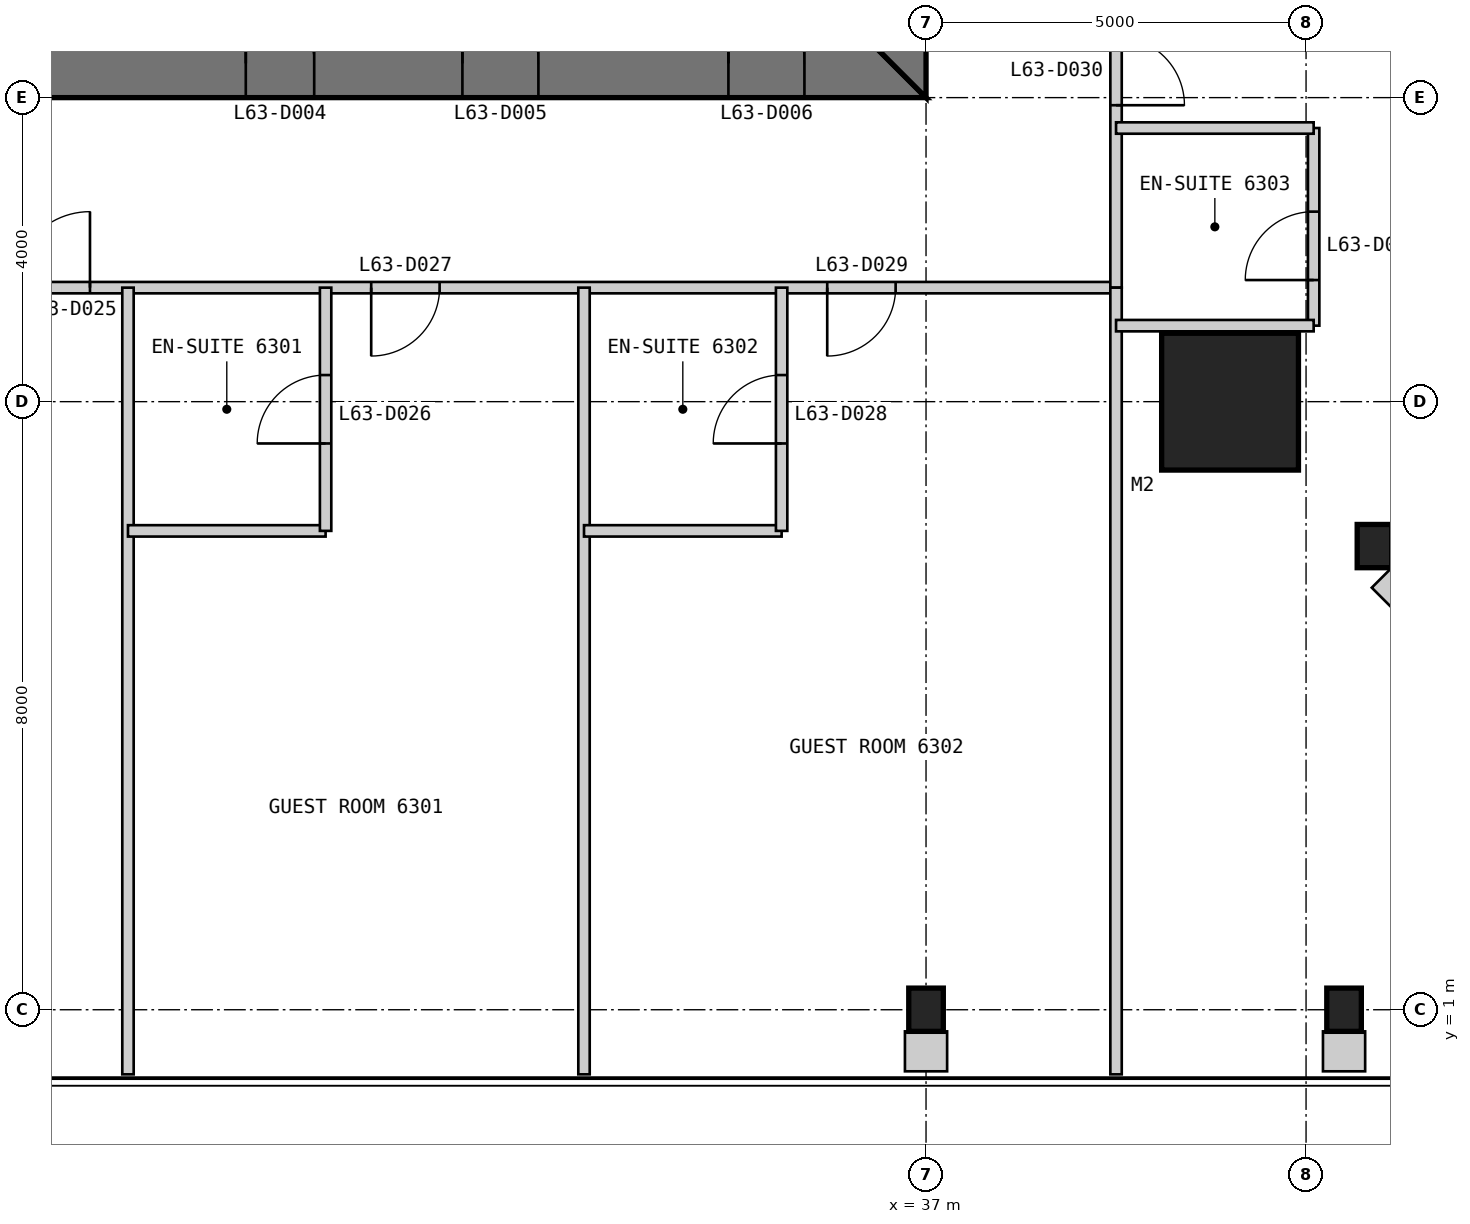
"""IFC4 building model, lengths in metres.
Left out: names, types, materials, properties, quantities, classifications, styles, units other than length and angle.
Written with IfcOpenShell. Run it as: python <this file> out.ifc"""

import sys

from ifc_helpers import new_model, si_unit, direction, frame, frame_2d, origin, origin_2d, place, context, subcontext, project, spatial, polyline, rectangle, i_section, outline, extrude, element, fill, save


model = new_model("IFC4")
c1 = context("Model", 3, precision=1e-05, world=origin(), true_north=direction((0.0, 1.0)))
c2 = subcontext(c1, "Body", "Model", "MODEL_VIEW")
j1 = project(units=[si_unit("LENGTHUNIT", "METRE"), si_unit("PLANEANGLEUNIT", "RADIAN")], contexts=[c1])
p1 = place(None, origin())
s1 = spatial("IfcSite", under=j1, at=p1, CompositionType="ELEMENT")
p2 = place(p1, origin())
s2 = spatial("IfcBuilding", under=s1, at=p2, CompositionType="ELEMENT")
p3 = place(p2, frame((0.0, 0.0, 266.2)))
s3 = spatial("IfcBuildingStorey", under=s2, at=p3, CompositionType="ELEMENT", Elevation=266.2)
p4 = place(p3, frame((41.0, 9.0, 0.0), z_axis=(0.0, 0.0, 1.0), x_axis=(1.0, 0.0, 0.0)))
e1 = element("IfcColumn", 1, at=p4, inside=s3, PredefinedType="COLUMN", context=c2, shape_type="SweptSolid", body=[
    extrude(rectangle(XDim=1.8, YDim=1.8, at=origin_2d()), origin(), (0.0, 0.0, 1.0), 3.4),
])
for number, where, z_axis, x_axis in (
    (2, (37.0, 1.0, 0.0), (0.0, 0.0, 1.0), (1.0, 0.0, 0.0)),
    (3, (42.5, 1.0, 0.0), (0.0, 0.0, 1.0), (1.0, 0.0, 0.0)),
    (4, (42.9, 7.1, 0.0), (0.0, 0.0, 1.0), (1.0, 0.0, 0.0)),
):
    element("IfcColumn", number, at=place(p3, frame(where, z_axis=z_axis, x_axis=x_axis)), inside=s3, PredefinedType="COLUMN", context=c2, shape_type="SweptSolid", body=[
        extrude(i_section(OverallWidth=0.455, OverallDepth=0.569, WebThickness=0.078, FlangeThickness=0.125, at=origin_2d()), origin(), (0.0, 0.0, 1.0), 3.4),
    ])
p5 = place(p3, frame((13.0, 13.45, 0.0), z_axis=(0.0, 0.0, 1.0), x_axis=(1.0, 0.0, 0.0)))
e5 = element("IfcWall", 5, at=p5, inside=s3, PredefinedType="SHEAR", context=c2, shape_type="SweptSolid", body=[
    extrude(outline(polyline([(0.0, -0.45), (24.0, -0.45), (23.1, 0.45), (0.9, 0.45), (0.0, -0.45)])), origin(), (0.0, 0.0, 1.0), 3.4),
])
p6 = place(p5, frame((4.9, 0.0, 0.0)))
e6 = element("IfcOpeningElement", 6, at=p6, cuts=e5, PredefinedType="OPENING", context=c2, shape_type="SweptSolid", body=[
    extrude(rectangle(XDim=1.0, YDim=2.2, at=frame_2d((0.5, 1.1))), frame((0.0, 0.46, 0.0), z_axis=(0.0, -1.0, 0.0), x_axis=(1.0, 0.0, 0.0)), (0.0, 0.0, 1.0), 0.92),
])
p7 = place(p5, frame((8.9, 0.0, 0.0)))
e7 = element("IfcOpeningElement", 7, at=p7, cuts=e5, PredefinedType="OPENING", context=c2, shape_type="SweptSolid", body=[
    extrude(rectangle(XDim=1.1, YDim=2.2, at=frame_2d((0.55, 1.1))), frame((0.0, 0.46, 0.0), z_axis=(0.0, -1.0, 0.0), x_axis=(1.0, 0.0, 0.0)), (0.0, 0.0, 1.0), 0.92),
])
p8 = place(p5, frame((15.05, 0.0, 0.0)))
e8 = element("IfcOpeningElement", 8, at=p8, cuts=e5, PredefinedType="OPENING", context=c2, shape_type="SweptSolid", body=[
    extrude(rectangle(XDim=0.9, YDim=2.2, at=frame_2d((0.45, 1.1))), frame((0.0, 0.46, 0.0), z_axis=(0.0, -1.0, 0.0), x_axis=(1.0, 0.0, 0.0)), (0.0, 0.0, 1.0), 0.92),
])
p9 = place(p5, frame((17.9, 0.0, 0.0)))
e9 = element("IfcOpeningElement", 9, at=p9, cuts=e5, PredefinedType="OPENING", context=c2, shape_type="SweptSolid", body=[
    extrude(rectangle(XDim=1.0, YDim=2.2, at=frame_2d((0.5, 1.1))), frame((0.0, 0.46, 0.0), z_axis=(0.0, -1.0, 0.0), x_axis=(1.0, 0.0, 0.0)), (0.0, 0.0, 1.0), 0.92),
])
p10 = place(p5, frame((21.4, 0.0, 0.0)))
e10 = element("IfcOpeningElement", 10, at=p10, cuts=e5, PredefinedType="OPENING", context=c2, shape_type="SweptSolid", body=[
    extrude(rectangle(XDim=1.0, YDim=2.2, at=frame_2d((0.5, 1.1))), frame((0.0, 0.46, 0.0), z_axis=(0.0, -1.0, 0.0), x_axis=(1.0, 0.0, 0.0)), (0.0, 0.0, 1.0), 0.92),
])
p11 = place(p3, frame((36.55, 13.9, 0.0), z_axis=(0.0, 0.0, 1.0), x_axis=(0.0, 1.0, 0.0)))
e11 = element("IfcWall", 11, at=p11, inside=s3, PredefinedType="SHEAR", context=c2, shape_type="SweptSolid", body=[
    extrude(outline(polyline([(-0.9, -0.45), (23.1, -0.45), (22.2, 0.45), (0.0, 0.45), (-0.9, -0.45)])), origin(), (0.0, 0.0, 1.0), 3.4),
])
p12 = place(p11, frame((20.2, 0.0, 0.0)))
e12 = element("IfcOpeningElement", 12, at=p12, cuts=e11, PredefinedType="OPENING", context=c2, shape_type="SweptSolid", body=[
    extrude(rectangle(XDim=1.0, YDim=2.2, at=frame_2d((0.5, 1.1))), frame((0.0, 0.46, 0.0), z_axis=(0.0, -1.0, 0.0), x_axis=(1.0, 0.0, 0.0)), (0.0, 0.0, 1.0), 0.92),
])
p13 = place(p11, frame((17.25, 0.0, 0.0)))
e13 = element("IfcOpeningElement", 13, at=p13, cuts=e11, PredefinedType="OPENING", context=c2, shape_type="SweptSolid", body=[
    extrude(rectangle(XDim=0.9, YDim=2.2, at=frame_2d((0.45, 1.1))), frame((0.0, 0.46, 0.0), z_axis=(0.0, -1.0, 0.0), x_axis=(1.0, 0.0, 0.0)), (0.0, 0.0, 1.0), 0.92),
])
p14 = place(p3, frame((10.5, 10.5, 0.0), z_axis=(0.0, 0.0, 1.0), x_axis=(1.0, 0.0, 0.0)))
e14 = element("IfcWall", 14, at=p14, inside=s3, PredefinedType="PARTITIONING", context=c2, shape_type="SweptSolid", body=[
    extrude(rectangle(XDim=29.0, YDim=0.15, at=frame_2d((14.5, 0.0))), origin(), (0.0, 0.0, 1.0), 3.25),
])
p15 = place(p14, frame((1.85, 0.0, 0.0)))
e15 = element("IfcOpeningElement", 15, at=p15, cuts=e14, PredefinedType="OPENING", context=c2, shape_type="SweptSolid", body=[
    extrude(rectangle(XDim=1.0, YDim=2.1, at=frame_2d((0.5, 1.05))), frame((0.0, 0.085, 0.0), z_axis=(0.0, -1.0, 0.0), x_axis=(1.0, 0.0, 0.0)), (0.0, 0.0, 1.0), 0.17),
])
p16 = place(p14, frame((14.5, 0.0, 0.0)))
e16 = element("IfcOpeningElement", 16, at=p16, cuts=e14, PredefinedType="OPENING", context=c2, shape_type="SweptSolid", body=[
    extrude(rectangle(XDim=1.0, YDim=2.1, at=frame_2d((0.5, 1.05))), frame((0.0, 0.085, 0.0), z_axis=(0.0, -1.0, 0.0), x_axis=(1.0, 0.0, 0.0)), (0.0, 0.0, 1.0), 0.17),
])
p17 = place(p14, frame((19.2, 0.0, 0.0)))
e17 = element("IfcOpeningElement", 17, at=p17, cuts=e14, PredefinedType="OPENING", context=c2, shape_type="SweptSolid", body=[
    extrude(rectangle(XDim=0.9, YDim=2.1, at=frame_2d((0.45, 1.05))), frame((0.0, 0.085, 0.0), z_axis=(0.0, -1.0, 0.0), x_axis=(1.0, 0.0, 0.0)), (0.0, 0.0, 1.0), 0.17),
])
p18 = place(p14, frame((25.2, 0.0, 0.0)))
e18 = element("IfcOpeningElement", 18, at=p18, cuts=e14, PredefinedType="OPENING", context=c2, shape_type="SweptSolid", body=[
    extrude(rectangle(XDim=0.9, YDim=2.1, at=frame_2d((0.45, 1.05))), frame((0.0, 0.085, 0.0), z_axis=(0.0, -1.0, 0.0), x_axis=(1.0, 0.0, 0.0)), (0.0, 0.0, 1.0), 0.17),
])
p19 = place(p3, frame((26.5, 0.15, 0.0), z_axis=(0.0, 0.0, 1.0), x_axis=(0.0, 1.0, 0.0)))
e19 = element("IfcWall", 19, at=p19, inside=s3, PredefinedType="PARTITIONING", context=c2, shape_type="SweptSolid", body=[
    extrude(rectangle(XDim=10.35, YDim=0.15, at=frame_2d((5.175, 0.0))), origin(), (0.0, 0.0, 1.0), 3.25),
])
p20 = place(p3, frame((26.5, 7.3, 0.0), z_axis=(0.0, 0.0, 1.0), x_axis=(1.0, 0.0, 0.0)))
e20 = element("IfcWall", 20, at=p20, inside=s3, PredefinedType="PARTITIONING", context=c2, shape_type="SweptSolid", body=[
    extrude(rectangle(XDim=2.6, YDim=0.15, at=frame_2d((1.3, 0.0))), origin(), (0.0, 0.0, 1.0), 3.25),
])
p21 = place(p3, frame((29.1, 7.3, 0.0), z_axis=(0.0, 0.0, 1.0), x_axis=(0.0, 1.0, 0.0)))
e21 = element("IfcWall", 21, at=p21, inside=s3, PredefinedType="PARTITIONING", context=c2, shape_type="SweptSolid", body=[
    extrude(rectangle(XDim=3.2, YDim=0.15, at=frame_2d((1.6, 0.0))), origin(), (0.0, 0.0, 1.0), 3.25),
])
p22 = place(p21, frame((1.15, 0.0, 0.0)))
e22 = element("IfcOpeningElement", 22, at=p22, cuts=e21, PredefinedType="OPENING", context=c2, shape_type="SweptSolid", body=[
    extrude(rectangle(XDim=0.9, YDim=2.1, at=frame_2d((0.45, 1.05))), frame((0.0, 0.085, 0.0), z_axis=(0.0, -1.0, 0.0), x_axis=(1.0, 0.0, 0.0)), (0.0, 0.0, 1.0), 0.17),
])
p23 = place(p3, frame((32.5, 0.15, 0.0), z_axis=(0.0, 0.0, 1.0), x_axis=(0.0, 1.0, 0.0)))
e23 = element("IfcWall", 23, at=p23, inside=s3, PredefinedType="PARTITIONING", context=c2, shape_type="SweptSolid", body=[
    extrude(rectangle(XDim=10.35, YDim=0.15, at=frame_2d((5.175, 0.0))), origin(), (0.0, 0.0, 1.0), 3.25),
])
p24 = place(p3, frame((32.5, 7.3, 0.0), z_axis=(0.0, 0.0, 1.0), x_axis=(1.0, 0.0, 0.0)))
e24 = element("IfcWall", 24, at=p24, inside=s3, PredefinedType="PARTITIONING", context=c2, shape_type="SweptSolid", body=[
    extrude(rectangle(XDim=2.6, YDim=0.15, at=frame_2d((1.3, 0.0))), origin(), (0.0, 0.0, 1.0), 3.25),
])
p25 = place(p3, frame((35.1, 7.3, 0.0), z_axis=(0.0, 0.0, 1.0), x_axis=(0.0, 1.0, 0.0)))
e25 = element("IfcWall", 25, at=p25, inside=s3, PredefinedType="PARTITIONING", context=c2, shape_type="SweptSolid", body=[
    extrude(rectangle(XDim=3.2, YDim=0.15, at=frame_2d((1.6, 0.0))), origin(), (0.0, 0.0, 1.0), 3.25),
])
p26 = place(p25, frame((1.15, 0.0, 0.0)))
e26 = element("IfcOpeningElement", 26, at=p26, cuts=e25, PredefinedType="OPENING", context=c2, shape_type="SweptSolid", body=[
    extrude(rectangle(XDim=0.9, YDim=2.1, at=frame_2d((0.45, 1.05))), frame((0.0, 0.085, 0.0), z_axis=(0.0, -1.0, 0.0), x_axis=(1.0, 0.0, 0.0)), (0.0, 0.0, 1.0), 0.17),
])
p27 = place(p3, frame((39.5, 10.5, 0.0), z_axis=(0.0, 0.0, 1.0), x_axis=(0.0, 1.0, 0.0)))
e27 = element("IfcWall", 27, at=p27, inside=s3, PredefinedType="PARTITIONING", context=c2, shape_type="SweptSolid", body=[
    extrude(rectangle(XDim=29.0, YDim=0.15, at=frame_2d((14.5, 0.0))), origin(), (0.0, 0.0, 1.0), 3.25),
])
p28 = place(p27, frame((2.4, 0.0, 0.0)))
e28 = element("IfcOpeningElement", 28, at=p28, cuts=e27, PredefinedType="OPENING", context=c2, shape_type="SweptSolid", body=[
    extrude(rectangle(XDim=0.9, YDim=2.1, at=frame_2d((0.45, 1.05))), frame((0.0, 0.085, 0.0), z_axis=(0.0, -1.0, 0.0), x_axis=(1.0, 0.0, 0.0)), (0.0, 0.0, 1.0), 0.17),
])
p29 = place(p27, frame((7.2, 0.0, 0.0)))
e29 = element("IfcOpeningElement", 29, at=p29, cuts=e27, PredefinedType="OPENING", context=c2, shape_type="SweptSolid", body=[
    extrude(rectangle(XDim=0.9, YDim=2.1, at=frame_2d((0.45, 1.05))), frame((0.0, 0.085, 0.0), z_axis=(0.0, -1.0, 0.0), x_axis=(1.0, 0.0, 0.0)), (0.0, 0.0, 1.0), 0.17),
])
p30 = place(p27, frame((13.6, 0.0, 0.0)))
e30 = element("IfcOpeningElement", 30, at=p30, cuts=e27, PredefinedType="OPENING", context=c2, shape_type="SweptSolid", body=[
    extrude(rectangle(XDim=0.9, YDim=2.1, at=frame_2d((0.45, 1.05))), frame((0.0, 0.085, 0.0), z_axis=(0.0, -1.0, 0.0), x_axis=(1.0, 0.0, 0.0)), (0.0, 0.0, 1.0), 0.17),
])
p31 = place(p27, frame((25.2, 0.0, 0.0)))
e31 = element("IfcOpeningElement", 31, at=p31, cuts=e27, PredefinedType="OPENING", context=c2, shape_type="SweptSolid", body=[
    extrude(rectangle(XDim=0.9, YDim=2.1, at=frame_2d((0.45, 1.05))), frame((0.0, 0.085, 0.0), z_axis=(0.0, -1.0, 0.0), x_axis=(1.0, 0.0, 0.0)), (0.0, 0.0, 1.0), 0.17),
])
p32 = place(p3, frame((39.5, 0.15, 0.0), z_axis=(0.0, 0.0, 1.0), x_axis=(0.0, 1.0, 0.0)))
e32 = element("IfcWall", 32, at=p32, inside=s3, PredefinedType="PARTITIONING", context=c2, shape_type="SweptSolid", body=[
    extrude(rectangle(XDim=10.35, YDim=0.15, at=frame_2d((5.175, 0.0))), origin(), (0.0, 0.0, 1.0), 3.25),
])
p33 = place(p3, frame((42.1, 10.0, 0.0), z_axis=(0.0, 0.0, 1.0), x_axis=(0.0, 1.0, 0.0)))
e33 = element("IfcWall", 33, at=p33, inside=s3, PredefinedType="PARTITIONING", context=c2, shape_type="SweptSolid", body=[
    extrude(rectangle(XDim=2.6, YDim=0.15, at=frame_2d((1.3, 0.0))), origin(), (0.0, 0.0, 1.0), 3.25),
])
p34 = place(p33, frame((0.6, 0.0, 0.0)))
e34 = element("IfcOpeningElement", 34, at=p34, cuts=e33, PredefinedType="OPENING", context=c2, shape_type="SweptSolid", body=[
    extrude(rectangle(XDim=0.9, YDim=2.1, at=frame_2d((0.45, 1.05))), frame((0.0, 0.085, 0.0), z_axis=(0.0, -1.0, 0.0), x_axis=(1.0, 0.0, 0.0)), (0.0, 0.0, 1.0), 0.17),
])
for number, where, z_axis, x_axis in (
    (35, (42.1, 10.0, 0.0), (0.0, 0.0, 1.0), (-1.0, 0.0, 0.0)),
    (36, (42.1, 12.6, 0.0), (0.0, 0.0, 1.0), (-1.0, 0.0, 0.0)),
):
    element("IfcWall", number, at=place(p3, frame(where, z_axis=z_axis, x_axis=x_axis)), inside=s3, PredefinedType="PARTITIONING", context=c2, shape_type="SweptSolid", body=[
        extrude(rectangle(XDim=2.6, YDim=0.15, at=frame_2d((1.3, 0.0))), origin(), (0.0, 0.0, 1.0), 3.25),
    ])
for number, where, z_axis, x_axis in (
    (37, (37.0, 0.19, 0.0), (0.0, 0.0, 1.0), (0.0, 1.0, 0.0)),
    (38, (42.5, 0.19, 0.0), (0.0, 0.0, 1.0), (0.0, 1.0, 0.0)),
):
    element("IfcWall", number, at=place(p3, frame(where, z_axis=z_axis, x_axis=x_axis)), inside=s3, PredefinedType="PARTITIONING", context=c2, shape_type="SweptSolid", body=[
        extrude(rectangle(XDim=0.526, YDim=0.555, at=frame_2d((0.263, 0.0))), origin(), (0.0, 0.0, 1.0), 3.25),
    ])
p35 = place(p3, frame((43.866, 6.134, 0.0), z_axis=(0.0, 0.0, 1.0), x_axis=(-0.707106781187, 0.707106781187, 0.0)))
e39 = element("IfcWall", 39, at=p35, inside=s3, PredefinedType="PARTITIONING", context=c2, shape_type="SweptSolid", body=[
    extrude(rectangle(XDim=1.004, YDim=0.824, at=frame_2d((0.502, 0.0))), origin(), (0.0, 0.0, 1.0), 3.25),
])
p36 = place(p8, origin())
e40 = element("IfcDoor", 40, at=p36, inside=s3, OperationType="SINGLE_SWING_LEFT", PredefinedType="DOOR", context=c2, shape_type="SweptSolid", body=[
    extrude(rectangle(XDim=0.9, YDim=2.2, at=frame_2d((0.45, 1.1))), frame((0.0, 0.025, 0.0), z_axis=(0.0, -1.0, 0.0), x_axis=(1.0, 0.0, 0.0)), (0.0, 0.0, 1.0), 0.05),
    extrude(outline(polyline([(0.0, 0.0), (0.04, 0.0), (0.04, 2.16), (0.86, 2.16), (0.86, 0.0), (0.9, 0.0), (0.9, 2.2), (0.0, 2.2), (0.0, 0.0)])), frame((0.0, 0.3, 0.0), z_axis=(0.0, -1.0, 0.0), x_axis=(1.0, 0.0, 0.0)), (0.0, 0.0, 1.0), 0.6),
])
fill(e8, e40)
p37 = place(p9, origin())
e41 = element("IfcDoor", 41, at=p37, inside=s3, OperationType="SINGLE_SWING_LEFT", PredefinedType="DOOR", context=c2, shape_type="SweptSolid", body=[
    extrude(rectangle(XDim=1.0, YDim=2.2, at=frame_2d((0.5, 1.1))), frame((0.0, 0.025, 0.0), z_axis=(0.0, -1.0, 0.0), x_axis=(1.0, 0.0, 0.0)), (0.0, 0.0, 1.0), 0.05),
    extrude(outline(polyline([(0.0, 0.0), (0.04, 0.0), (0.04, 2.16), (0.96, 2.16), (0.96, 0.0), (1.0, 0.0), (1.0, 2.2), (0.0, 2.2), (0.0, 0.0)])), frame((0.0, 0.3, 0.0), z_axis=(0.0, -1.0, 0.0), x_axis=(1.0, 0.0, 0.0)), (0.0, 0.0, 1.0), 0.6),
])
fill(e9, e41)
p38 = place(p10, origin())
e42 = element("IfcDoor", 42, at=p38, inside=s3, OperationType="SINGLE_SWING_LEFT", PredefinedType="DOOR", context=c2, shape_type="SweptSolid", body=[
    extrude(rectangle(XDim=1.0, YDim=2.2, at=frame_2d((0.5, 1.1))), frame((0.0, 0.025, 0.0), z_axis=(0.0, -1.0, 0.0), x_axis=(1.0, 0.0, 0.0)), (0.0, 0.0, 1.0), 0.05),
    extrude(outline(polyline([(0.0, 0.0), (0.04, 0.0), (0.04, 2.16), (0.96, 2.16), (0.96, 0.0), (1.0, 0.0), (1.0, 2.2), (0.0, 2.2), (0.0, 0.0)])), frame((0.0, 0.3, 0.0), z_axis=(0.0, -1.0, 0.0), x_axis=(1.0, 0.0, 0.0)), (0.0, 0.0, 1.0), 0.6),
])
fill(e10, e42)
p39 = place(p16, origin())
e43 = element("IfcDoor", 43, at=p39, inside=s3, OperationType="SINGLE_SWING_RIGHT", PredefinedType="DOOR", context=c2, shape_type="SweptSolid", body=[
    extrude(rectangle(XDim=1.0, YDim=2.1, at=frame_2d((0.5, 1.05))), frame((0.0, 0.025, 0.0), z_axis=(0.0, -1.0, 0.0), x_axis=(1.0, 0.0, 0.0)), (0.0, 0.0, 1.0), 0.05),
])
fill(e16, e43)
p40 = place(p22, origin())
e44 = element("IfcDoor", 44, at=p40, inside=s3, OperationType="SINGLE_SWING_LEFT", PredefinedType="DOOR", context=c2, shape_type="SweptSolid", body=[
    extrude(rectangle(XDim=0.9, YDim=2.1, at=frame_2d((0.45, 1.05))), frame((0.0, 0.025, 0.0), z_axis=(0.0, -1.0, 0.0), x_axis=(1.0, 0.0, 0.0)), (0.0, 0.0, 1.0), 0.05),
])
fill(e22, e44)
p41 = place(p17, frame((0.9, 0.0, 0.0), z_axis=(0.0, 0.0, 1.0), x_axis=(-1.0, 0.0, 0.0)))
e45 = element("IfcDoor", 45, at=p41, inside=s3, OperationType="SINGLE_SWING_RIGHT", PredefinedType="DOOR", context=c2, shape_type="SweptSolid", body=[
    extrude(rectangle(XDim=0.9, YDim=2.1, at=frame_2d((0.45, 1.05))), frame((0.0, 0.025, 0.0), z_axis=(0.0, -1.0, 0.0), x_axis=(1.0, 0.0, 0.0)), (0.0, 0.0, 1.0), 0.05),
])
fill(e17, e45)
p42 = place(p26, origin())
e46 = element("IfcDoor", 46, at=p42, inside=s3, OperationType="SINGLE_SWING_LEFT", PredefinedType="DOOR", context=c2, shape_type="SweptSolid", body=[
    extrude(rectangle(XDim=0.9, YDim=2.1, at=frame_2d((0.45, 1.05))), frame((0.0, 0.025, 0.0), z_axis=(0.0, -1.0, 0.0), x_axis=(1.0, 0.0, 0.0)), (0.0, 0.0, 1.0), 0.05),
])
fill(e26, e46)
p43 = place(p18, frame((0.9, 0.0, 0.0), z_axis=(0.0, 0.0, 1.0), x_axis=(-1.0, 0.0, 0.0)))
e47 = element("IfcDoor", 47, at=p43, inside=s3, OperationType="SINGLE_SWING_RIGHT", PredefinedType="DOOR", context=c2, shape_type="SweptSolid", body=[
    extrude(rectangle(XDim=0.9, YDim=2.1, at=frame_2d((0.45, 1.05))), frame((0.0, 0.025, 0.0), z_axis=(0.0, -1.0, 0.0), x_axis=(1.0, 0.0, 0.0)), (0.0, 0.0, 1.0), 0.05),
])
fill(e18, e47)
p44 = place(p28, frame((0.9, 0.0, 0.0), z_axis=(0.0, 0.0, 1.0), x_axis=(-1.0, 0.0, 0.0)))
e48 = element("IfcDoor", 48, at=p44, inside=s3, OperationType="SINGLE_SWING_RIGHT", PredefinedType="DOOR", context=c2, shape_type="SweptSolid", body=[
    extrude(rectangle(XDim=0.9, YDim=2.1, at=frame_2d((0.45, 1.05))), frame((0.0, 0.025, 0.0), z_axis=(0.0, -1.0, 0.0), x_axis=(1.0, 0.0, 0.0)), (0.0, 0.0, 1.0), 0.05),
])
fill(e28, e48)
p45 = place(p34, origin())
e49 = element("IfcDoor", 49, at=p45, inside=s3, OperationType="SINGLE_SWING_LEFT", PredefinedType="DOOR", context=c2, shape_type="SweptSolid", body=[
    extrude(rectangle(XDim=0.9, YDim=2.1, at=frame_2d((0.45, 1.05))), frame((0.0, 0.025, 0.0), z_axis=(0.0, -1.0, 0.0), x_axis=(1.0, 0.0, 0.0)), (0.0, 0.0, 1.0), 0.05),
])
fill(e34, e49)
save(model, sys.argv[1])
